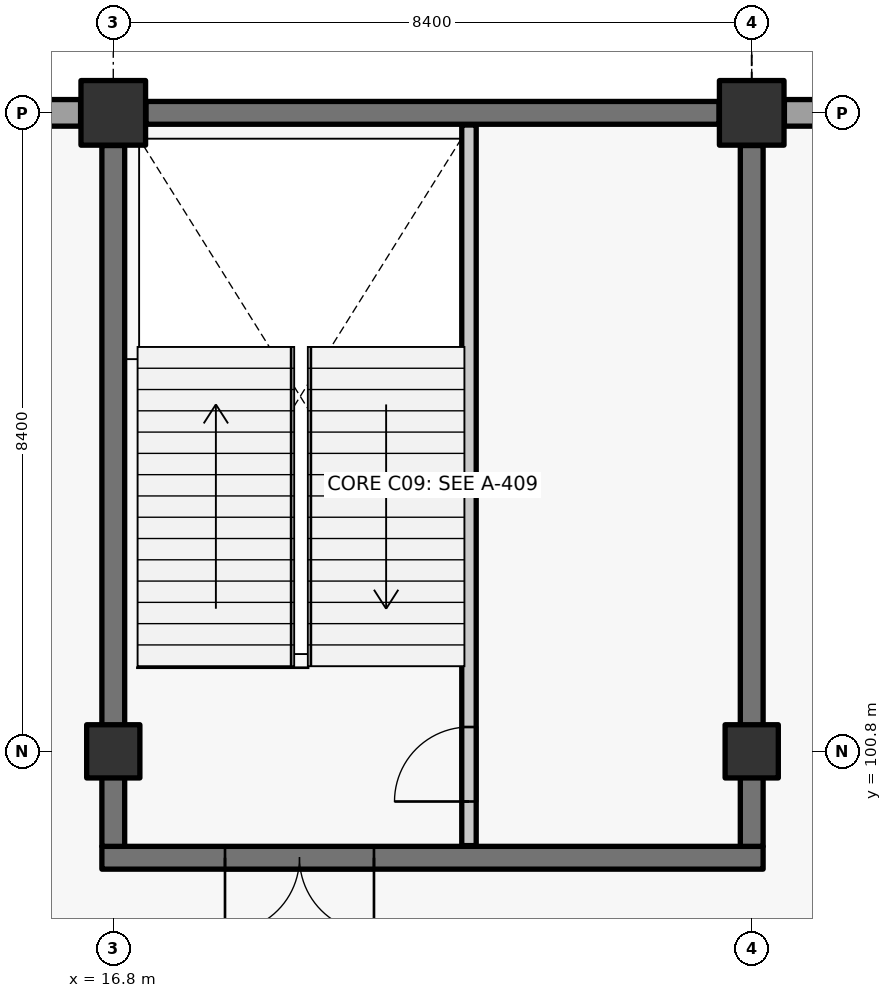
"""IFC4 building model, lengths in metres.
Left out: names, types, materials, properties, quantities, classifications, styles, units other than length and angle.
Written with IfcOpenShell. Run it as: python <this file> out.ifc"""

import sys

from ifc_helpers import new_model, si_unit, direction, frame, frame_2d, origin, origin_2d, place, context, subcontext, project, spatial, rectangle, extrude, element, fill, save


model = new_model("IFC4")
c1 = context("Model", 3, precision=1e-05, world=origin(), true_north=direction((0.0, 1.0)))
c2 = subcontext(c1, "Body", "Model", "MODEL_VIEW")
j1 = project(units=[si_unit("LENGTHUNIT", "METRE"), si_unit("PLANEANGLEUNIT", "RADIAN")], contexts=[c1])
p1 = place(None, origin())
s1 = spatial("IfcSite", under=j1, at=p1, CompositionType="ELEMENT")
p2 = place(p1, origin())
s2 = spatial("IfcBuilding", under=s1, at=p2, CompositionType="ELEMENT")
p3 = place(p2, frame((0.0, 0.0, 6.0)))
s3 = spatial("IfcBuildingStorey", under=s2, at=p3, CompositionType="ELEMENT", Elevation=6.0)
p4 = place(p3, frame((16.8, 100.8, 0.0), z_axis=(0.0, 0.0, 1.0), x_axis=(1.0, 0.0, 0.0)))
e1 = element("IfcColumn", 1, at=p4, inside=s3, PredefinedType="COLUMN", context=c2, shape_type="SweptSolid", body=[
    extrude(rectangle(XDim=0.7, YDim=0.7, at=origin_2d()), origin(), (0.0, 0.0, 1.0), 5.4),
])
p5 = place(p3, frame((16.8, 109.2, 0.0), z_axis=(0.0, 0.0, 1.0), x_axis=(1.0, 0.0, 0.0)))
e2 = element("IfcColumn", 2, at=p5, inside=s3, PredefinedType="COLUMN", context=c2, shape_type="SweptSolid", body=[
    extrude(rectangle(XDim=0.85, YDim=0.85, at=origin_2d()), origin(), (0.0, 0.0, 1.0), 5.4),
])
p6 = place(p3, frame((25.2, 100.8, 0.0), z_axis=(0.0, 0.0, 1.0), x_axis=(1.0, 0.0, 0.0)))
e3 = element("IfcColumn", 3, at=p6, inside=s3, PredefinedType="COLUMN", context=c2, shape_type="SweptSolid", body=[
    extrude(rectangle(XDim=0.7, YDim=0.7, at=origin_2d()), origin(), (0.0, 0.0, 1.0), 5.4),
])
p7 = place(p3, frame((25.2, 109.2, 0.0), z_axis=(0.0, 0.0, 1.0), x_axis=(1.0, 0.0, 0.0)))
e4 = element("IfcColumn", 4, at=p7, inside=s3, PredefinedType="COLUMN", context=c2, shape_type="SweptSolid", body=[
    extrude(rectangle(XDim=0.85, YDim=0.85, at=origin_2d()), origin(), (0.0, 0.0, 1.0), 5.4),
])
p8 = place(p3, frame((8.83, 109.2, 0.0), z_axis=(0.0, 0.0, 1.0), x_axis=(1.0, 0.0, 0.0)))
e5 = element("IfcWall", 5, at=p8, inside=s3, PredefinedType="SOLIDWALL", context=c2, shape_type="SweptSolid", body=[
    extrude(rectangle(XDim=7.54, YDim=0.35, at=frame_2d((3.77, 0.0))), origin(), (0.0, 0.0, 1.0), 4.64),
])
p9 = place(p8, frame((1.97, 0.0, 1.4)))
e6 = element("IfcOpeningElement", 6, at=p9, cuts=e5, PredefinedType="OPENING", context=c2, shape_type="SweptSolid", body=[
    extrude(rectangle(XDim=3.6, YDim=1.35, at=frame_2d((1.8, 0.675))), frame((0.0, 0.185, 0.0), z_axis=(0.0, -1.0, 0.0), x_axis=(1.0, 0.0, 0.0)), (0.0, 0.0, 1.0), 0.37),
])
p10 = place(p3, frame((25.63, 109.2, 0.0), z_axis=(0.0, 0.0, 1.0), x_axis=(1.0, 0.0, 0.0)))
e7 = element("IfcWall", 7, at=p10, inside=s3, PredefinedType="SOLIDWALL", context=c2, shape_type="SweptSolid", body=[
    extrude(rectangle(XDim=7.54, YDim=0.35, at=frame_2d((3.77, 0.0))), origin(), (0.0, 0.0, 1.0), 4.64),
])
p11 = place(p10, frame((1.97, 0.0, 1.4)))
e8 = element("IfcOpeningElement", 8, at=p11, cuts=e7, PredefinedType="OPENING", context=c2, shape_type="SweptSolid", body=[
    extrude(rectangle(XDim=3.6, YDim=1.35, at=frame_2d((1.8, 0.675))), frame((0.0, 0.185, 0.0), z_axis=(0.0, -1.0, 0.0), x_axis=(1.0, 0.0, 0.0)), (0.0, 0.0, 1.0), 0.37),
])
p12 = place(p3, frame((25.35, 99.4, 0.0), z_axis=(0.0, 0.0, 1.0), x_axis=(-1.0, 0.0, 0.0)))
e9 = element("IfcWall", 9, at=p12, inside=s3, PredefinedType="SHEAR", context=c2, shape_type="SweptSolid", body=[
    extrude(rectangle(XDim=8.7, YDim=0.3, at=frame_2d((4.35, 0.0))), origin(), (0.0, 0.0, 1.0), 5.12),
])
p13 = place(p12, frame((5.12, 0.0, 0.0)))
e10 = element("IfcOpeningElement", 10, at=p13, cuts=e9, PredefinedType="OPENING", context=c2, shape_type="SweptSolid", body=[
    extrude(rectangle(XDim=1.96, YDim=2.2, at=frame_2d((0.98, 1.1))), frame((0.0, 0.16, 0.0), z_axis=(0.0, -1.0, 0.0), x_axis=(1.0, 0.0, 0.0)), (0.0, 0.0, 1.0), 0.32),
])
p14 = place(p3, frame((16.8, 99.55, 0.0), z_axis=(0.0, 0.0, 1.0), x_axis=(0.0, 1.0, 0.0)))
e11 = element("IfcWall", 11, at=p14, inside=s3, PredefinedType="SHEAR", context=c2, shape_type="SweptSolid", body=[
    extrude(rectangle(XDim=9.22, YDim=0.3, at=frame_2d((4.61, 0.0))), origin(), (0.0, 0.0, 1.0), 5.12),
])
p15 = place(p3, frame((17.23, 109.2, 0.0), z_axis=(0.0, 0.0, 1.0), x_axis=(1.0, 0.0, 0.0)))
e12 = element("IfcWall", 12, at=p15, inside=s3, PredefinedType="SHEAR", context=c2, shape_type="SweptSolid", body=[
    extrude(rectangle(XDim=7.54, YDim=0.3, at=frame_2d((3.77, 0.0))), origin(), (0.0, 0.0, 1.0), 5.12),
])
p16 = place(p3, frame((25.2, 108.77, 0.0), z_axis=(0.0, 0.0, 1.0), x_axis=(0.0, -1.0, 0.0)))
e13 = element("IfcWall", 13, at=p16, inside=s3, PredefinedType="SHEAR", context=c2, shape_type="SweptSolid", body=[
    extrude(rectangle(XDim=9.22, YDim=0.3, at=frame_2d((4.61, 0.0))), origin(), (0.0, 0.0, 1.0), 5.12),
])
p17 = place(p3, frame((21.48, 99.56, 0.0), z_axis=(0.0, 0.0, 1.0), x_axis=(0.0, 1.0, 0.0)))
e14 = element("IfcWall", 14, at=p17, inside=s3, PredefinedType="SOLIDWALL", context=c2, shape_type="SweptSolid", body=[
    extrude(rectangle(XDim=9.48, YDim=0.19, at=frame_2d((4.74, 0.0))), origin(), (0.0, 0.0, 1.0), 5.12),
])
p18 = place(p17, frame((0.58, 0.0, 0.0)))
e15 = element("IfcOpeningElement", 15, at=p18, cuts=e14, PredefinedType="OPENING", context=c2, shape_type="SweptSolid", body=[
    extrude(rectangle(XDim=0.98, YDim=2.15, at=frame_2d((0.49, 1.075))), frame((0.0, 0.105, 0.0), z_axis=(0.0, -1.0, 0.0), x_axis=(1.0, 0.0, 0.0)), (0.0, 0.0, 1.0), 0.21),
])
p19 = place(p18, origin())
e16 = element("IfcDoor", 16, at=p19, inside=s3, OperationType="SINGLE_SWING_LEFT", PredefinedType="DOOR", context=c2, shape_type="SweptSolid", body=[
    extrude(rectangle(XDim=0.98, YDim=2.15, at=frame_2d((0.49, 1.075))), frame((0.0, 0.025, 0.0), z_axis=(0.0, -1.0, 0.0), x_axis=(1.0, 0.0, 0.0)), (0.0, 0.0, 1.0), 0.05),
])
fill(e15, e16)
p20 = place(p13, origin())
e17 = element("IfcDoor", 17, at=p20, inside=s3, OperationType="DOUBLE_DOOR_SINGLE_SWING", PredefinedType="DOOR", context=c2, shape_type="SweptSolid", body=[
    extrude(rectangle(XDim=1.96, YDim=2.2, at=frame_2d((0.98, 1.1))), frame((0.0, 0.025, 0.0), z_axis=(0.0, -1.0, 0.0), x_axis=(1.0, 0.0, 0.0)), (0.0, 0.0, 1.0), 0.05),
])
fill(e10, e17)
save(model, sys.argv[1])
